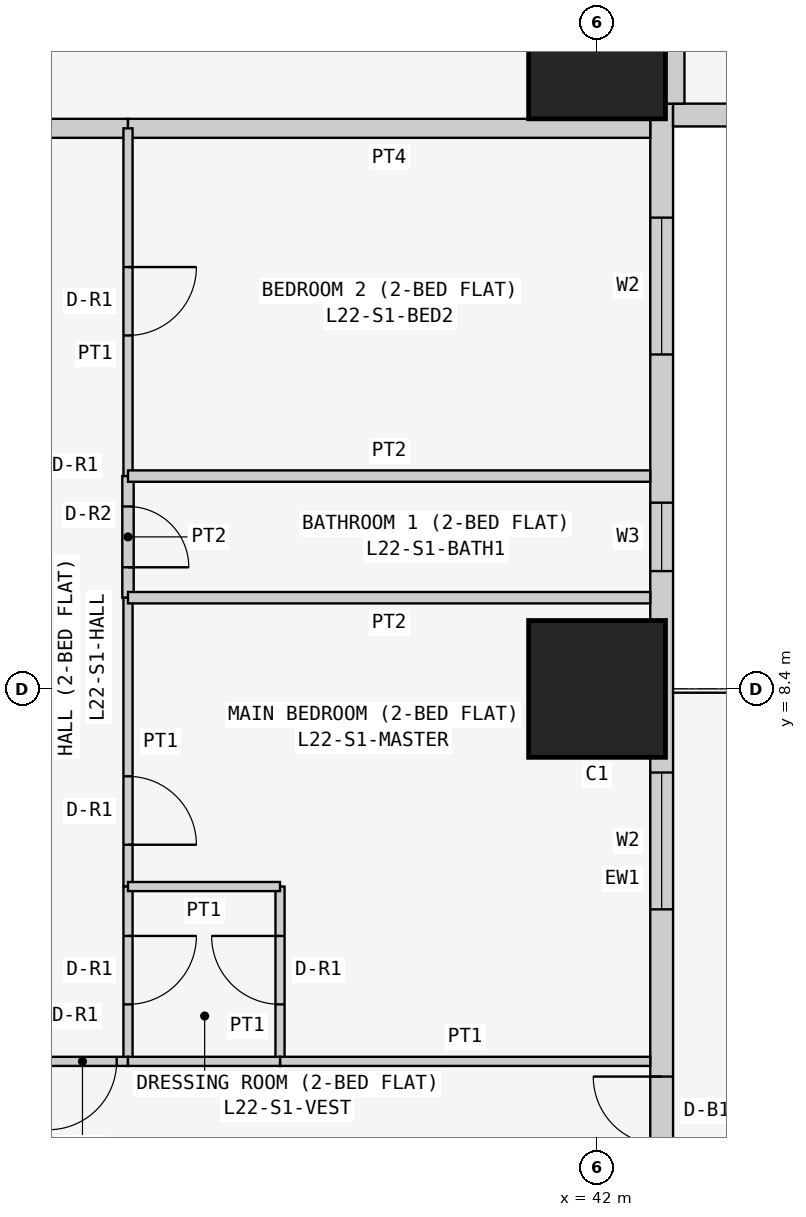
"""IFC4 building model, lengths in metres.
Left out: names, types, materials, properties, quantities, classifications, styles, units other than length and angle.
Written with IfcOpenShell. Run it as: python <this file> out.ifc"""

import sys

from ifc_helpers import new_model, si_unit, direction, frame, frame_2d, origin, origin_2d, place, context, subcontext, project, spatial, rectangle, extrude, element, fill, save


model = new_model("IFC4")
c1 = context("Model", 3, precision=1e-05, world=origin(), true_north=direction((0.0, 1.0)))
c2 = subcontext(c1, "Body", "Model", "MODEL_VIEW")
j1 = project(units=[si_unit("LENGTHUNIT", "METRE"), si_unit("PLANEANGLEUNIT", "RADIAN")], contexts=[c1])
p1 = place(None, origin())
s1 = spatial("IfcSite", under=j1, at=p1, CompositionType="ELEMENT")
p2 = place(p1, origin())
s2 = spatial("IfcBuilding", under=s1, at=p2, CompositionType="ELEMENT")
p3 = place(p2, frame((0.0, 0.0, 88.5)))
s3 = spatial("IfcBuildingStorey", under=s2, at=p3, CompositionType="ELEMENT", Elevation=88.5)
for number, where, z_axis, x_axis in (
    (1, (42.0, 8.4, 0.0), (0.0, 0.0, 1.0), (1.0, 0.0, 0.0)),
    (2, (42.0, 16.8, 0.0), (0.0, 0.0, 1.0), (1.0, 0.0, 0.0)),
):
    element("IfcColumn", number, at=place(p3, frame(where, z_axis=z_axis, x_axis=x_axis)), inside=s3, PredefinedType="COLUMN", context=c2, shape_type="SweptSolid", body=[
        extrude(rectangle(XDim=1.8, YDim=1.8, at=origin_2d()), origin(), (0.0, 0.0, 1.0), 3.6),
    ])
p4 = place(p3, frame((42.85, 0.4, 0.0), z_axis=(0.0, 0.0, 1.0), x_axis=(0.0, 1.0, 0.0)))
e3 = element("IfcWall", 3, at=p4, inside=s3, PredefinedType="SOLIDWALL", context=c2, shape_type="SweptSolid", body=[
    extrude(rectangle(XDim=15.7, YDim=0.3, at=frame_2d((7.85, 0.0))), origin(), (0.0, 0.0, 1.0), 3.45),
])
p5 = place(p4, frame((12.4, 0.0, 0.9)))
e4 = element("IfcOpeningElement", 4, at=p5, cuts=e3, PredefinedType="OPENING", context=c2, shape_type="SweptSolid", body=[
    extrude(rectangle(XDim=1.8, YDim=1.5, at=frame_2d((0.9, 0.75))), frame((0.0, 0.16, 0.0), z_axis=(0.0, -1.0, 0.0), x_axis=(1.0, 0.0, 0.0)), (0.0, 0.0, 1.0), 0.32),
])
p6 = place(p4, frame((9.55, 0.0, 1.5)))
e5 = element("IfcOpeningElement", 5, at=p6, cuts=e3, PredefinedType="OPENING", context=c2, shape_type="SweptSolid", body=[
    extrude(rectangle(XDim=0.9, YDim=0.7, at=frame_2d((0.45, 0.35))), frame((0.0, 0.16, 0.0), z_axis=(0.0, -1.0, 0.0), x_axis=(1.0, 0.0, 0.0)), (0.0, 0.0, 1.0), 0.32),
])
p7 = place(p4, frame((5.1, 0.0, 0.9)))
e6 = element("IfcOpeningElement", 6, at=p7, cuts=e3, PredefinedType="OPENING", context=c2, shape_type="SweptSolid", body=[
    extrude(rectangle(XDim=1.8, YDim=1.5, at=frame_2d((0.9, 0.75))), frame((0.0, 0.16, 0.0), z_axis=(0.0, -1.0, 0.0), x_axis=(1.0, 0.0, 0.0)), (0.0, 0.0, 1.0), 0.32),
])
p8 = place(p4, frame((2.0, 0.0, 0.0)))
e7 = element("IfcOpeningElement", 7, at=p8, cuts=e3, PredefinedType="OPENING", context=c2, shape_type="SweptSolid", body=[
    extrude(rectangle(XDim=0.9, YDim=2.4, at=frame_2d((0.45, 1.2))), frame((0.0, 0.16, 0.0), z_axis=(0.0, -1.0, 0.0), x_axis=(1.0, 0.0, 0.0)), (0.0, 0.0, 1.0), 0.32),
])
p9 = place(p4, frame((0.7, 0.0, 0.9)))
e8 = element("IfcOpeningElement", 8, at=p9, cuts=e3, PredefinedType="OPENING", context=c2, shape_type="SweptSolid", body=[
    extrude(rectangle(XDim=1.2, YDim=1.5, at=frame_2d((0.6, 0.75))), frame((0.0, 0.16, 0.0), z_axis=(0.0, -1.0, 0.0), x_axis=(1.0, 0.0, 0.0)), (0.0, 0.0, 1.0), 0.32),
])
p10 = place(p3, frame((43.0, 15.95, 0.0), z_axis=(0.0, 0.0, 1.0), x_axis=(1.0, 0.0, 0.0)))
e9 = element("IfcWall", 9, at=p10, inside=s3, PredefinedType="SOLIDWALL", context=c2, shape_type="SweptSolid", body=[
    extrude(rectangle(XDim=15.4, YDim=0.3, at=frame_2d((7.7, 0.0))), origin(), (0.0, 0.0, 1.0), 3.45),
])
p11 = place(p10, frame((1.2, 0.0, 0.9)))
e10 = element("IfcOpeningElement", 10, at=p11, cuts=e9, PredefinedType="OPENING", context=c2, shape_type="SweptSolid", body=[
    extrude(rectangle(XDim=1.8, YDim=1.5, at=frame_2d((0.9, 0.75))), frame((0.0, 0.16, 0.0), z_axis=(0.0, -1.0, 0.0), x_axis=(1.0, 0.0, 0.0)), (0.0, 0.0, 1.0), 0.32),
])
p12 = place(p10, frame((4.95, 0.0, 1.5)))
e11 = element("IfcOpeningElement", 11, at=p12, cuts=e9, PredefinedType="OPENING", context=c2, shape_type="SweptSolid", body=[
    extrude(rectangle(XDim=0.9, YDim=0.7, at=frame_2d((0.45, 0.35))), frame((0.0, 0.16, 0.0), z_axis=(0.0, -1.0, 0.0), x_axis=(1.0, 0.0, 0.0)), (0.0, 0.0, 1.0), 0.32),
])
p13 = place(p10, frame((8.5, 0.0, 0.9)))
e12 = element("IfcOpeningElement", 12, at=p13, cuts=e9, PredefinedType="OPENING", context=c2, shape_type="SweptSolid", body=[
    extrude(rectangle(XDim=1.8, YDim=1.5, at=frame_2d((0.9, 0.75))), frame((0.0, 0.16, 0.0), z_axis=(0.0, -1.0, 0.0), x_axis=(1.0, 0.0, 0.0)), (0.0, 0.0, 1.0), 0.32),
])
p14 = place(p10, frame((12.5, 0.0, 0.0)))
e13 = element("IfcOpeningElement", 13, at=p14, cuts=e9, PredefinedType="OPENING", context=c2, shape_type="SweptSolid", body=[
    extrude(rectangle(XDim=0.9, YDim=2.4, at=frame_2d((0.45, 1.2))), frame((0.0, 0.16, 0.0), z_axis=(0.0, -1.0, 0.0), x_axis=(1.0, 0.0, 0.0)), (0.0, 0.0, 1.0), 0.32),
])
p15 = place(p10, frame((13.5, 0.0, 0.9)))
e14 = element("IfcOpeningElement", 14, at=p15, cuts=e9, PredefinedType="OPENING", context=c2, shape_type="SweptSolid", body=[
    extrude(rectangle(XDim=1.2, YDim=1.5, at=frame_2d((0.6, 0.75))), frame((0.0, 0.16, 0.0), z_axis=(0.0, -1.0, 0.0), x_axis=(1.0, 0.0, 0.0)), (0.0, 0.0, 1.0), 0.32),
])
p16 = place(p3, frame((43.025, 22.571, 0.0), z_axis=(0.0, 0.0, 1.0), x_axis=(0.0, -1.0, 0.0)))
e15 = element("IfcWall", 15, at=p16, inside=s3, PredefinedType="PARTITIONING", context=c2, shape_type="SweptSolid", body=[
    extrude(rectangle(XDim=6.471, YDim=0.25, at=frame_2d((3.235, 0.0))), origin(), (0.0, 0.0, 1.0), 3.45),
])
p17 = place(p3, frame((35.829, 15.775, 0.0), z_axis=(0.0, 0.0, 1.0), x_axis=(-1.0, 0.0, 0.0)))
e16 = element("IfcWall", 16, at=p17, inside=s3, PredefinedType="PARTITIONING", context=c2, shape_type="SweptSolid", body=[
    extrude(rectangle(XDim=1.2, YDim=0.25, at=frame_2d((0.6, 0.0))), origin(), (0.0, 0.0, 1.0), 3.45),
])
p18 = place(p3, frame((42.7, 15.775, 0.0), z_axis=(0.0, 0.0, 1.0), x_axis=(-1.0, 0.0, 0.0)))
e17 = element("IfcWall", 17, at=p18, inside=s3, PredefinedType="PARTITIONING", context=c2, shape_type="SweptSolid", body=[
    extrude(rectangle(XDim=6.871, YDim=0.25, at=frame_2d((3.436, 0.0))), origin(), (0.0, 0.0, 1.0), 3.45),
])
p19 = place(p3, frame((35.829, 11.2, 0.0), z_axis=(0.0, 0.0, 1.0), x_axis=(0.0, 1.0, 0.0)))
e18 = element("IfcWall", 18, at=p19, inside=s3, PredefinedType="PARTITIONING", context=c2, shape_type="SweptSolid", body=[
    extrude(rectangle(XDim=4.575, YDim=0.12, at=frame_2d((2.288, 0.0))), origin(), (0.0, 0.0, 1.0), 3.45),
])
p20 = place(p19, frame((1.85, 0.0, 0.0)))
e19 = element("IfcOpeningElement", 19, at=p20, cuts=e18, PredefinedType="OPENING", context=c2, shape_type="SweptSolid", body=[
    extrude(rectangle(XDim=0.9, YDim=2.1, at=frame_2d((0.45, 1.05))), frame((0.0, 0.07, 0.0), z_axis=(0.0, -1.0, 0.0), x_axis=(1.0, 0.0, 0.0)), (0.0, 0.0, 1.0), 0.14),
])
p21 = place(p3, frame((35.829, 9.6, 0.0), z_axis=(0.0, 0.0, 1.0), x_axis=(0.0, 1.0, 0.0)))
e20 = element("IfcWall", 20, at=p21, inside=s3, PredefinedType="PARTITIONING", context=c2, shape_type="SweptSolid", body=[
    extrude(rectangle(XDim=1.6, YDim=0.15, at=frame_2d((0.8, 0.0))), origin(), (0.0, 0.0, 1.0), 3.45),
])
p22 = place(p21, frame((0.4, 0.0, 0.0)))
e21 = element("IfcOpeningElement", 21, at=p22, cuts=e20, PredefinedType="OPENING", context=c2, shape_type="SweptSolid", body=[
    extrude(rectangle(XDim=0.8, YDim=2.1, at=frame_2d((0.4, 1.05))), frame((0.0, 0.085, 0.0), z_axis=(0.0, -1.0, 0.0), x_axis=(1.0, 0.0, 0.0)), (0.0, 0.0, 1.0), 0.17),
])
p23 = place(p3, frame((35.829, 5.8, 0.0), z_axis=(0.0, 0.0, 1.0), x_axis=(0.0, 1.0, 0.0)))
e22 = element("IfcWall", 22, at=p23, inside=s3, PredefinedType="PARTITIONING", context=c2, shape_type="SweptSolid", body=[
    extrude(rectangle(XDim=3.8, YDim=0.12, at=frame_2d((1.9, 0.0))), origin(), (0.0, 0.0, 1.0), 3.45),
])
p24 = place(p23, frame((0.55, 0.0, 0.0)))
e23 = element("IfcOpeningElement", 23, at=p24, cuts=e22, PredefinedType="OPENING", context=c2, shape_type="SweptSolid", body=[
    extrude(rectangle(XDim=0.9, YDim=2.1, at=frame_2d((0.45, 1.05))), frame((0.0, 0.07, 0.0), z_axis=(0.0, -1.0, 0.0), x_axis=(1.0, 0.0, 0.0)), (0.0, 0.0, 1.0), 0.14),
])
p25 = place(p3, frame((35.829, 3.5, 0.0), z_axis=(0.0, 0.0, 1.0), x_axis=(0.0, 1.0, 0.0)))
e24 = element("IfcWall", 24, at=p25, inside=s3, PredefinedType="PARTITIONING", context=c2, shape_type="SweptSolid", body=[
    extrude(rectangle(XDim=2.3, YDim=0.12, at=frame_2d((1.15, 0.0))), origin(), (0.0, 0.0, 1.0), 3.45),
])
p26 = place(p25, frame((0.75, 0.0, 0.0)))
e25 = element("IfcOpeningElement", 25, at=p26, cuts=e24, PredefinedType="OPENING", context=c2, shape_type="SweptSolid", body=[
    extrude(rectangle(XDim=0.9, YDim=2.1, at=frame_2d((0.45, 1.05))), frame((0.0, 0.07, 0.0), z_axis=(0.0, -1.0, 0.0), x_axis=(1.0, 0.0, 0.0)), (0.0, 0.0, 1.0), 0.14),
])
p27 = place(p3, frame((34.629, 3.5, 0.0), z_axis=(0.0, 0.0, 1.0), x_axis=(1.0, 0.0, 0.0)))
e26 = element("IfcWall", 26, at=p27, inside=s3, PredefinedType="PARTITIONING", context=c2, shape_type="SweptSolid", body=[
    extrude(rectangle(XDim=1.2, YDim=0.12, at=frame_2d((0.6, 0.0))), origin(), (0.0, 0.0, 1.0), 3.45),
])
p28 = place(p27, frame((0.151, 0.0, 0.0)))
e27 = element("IfcOpeningElement", 27, at=p28, cuts=e26, PredefinedType="OPENING", context=c2, shape_type="SweptSolid", body=[
    extrude(rectangle(XDim=0.9, YDim=2.1, at=frame_2d((0.45, 1.05))), frame((0.0, 0.07, 0.0), z_axis=(0.0, -1.0, 0.0), x_axis=(1.0, 0.0, 0.0)), (0.0, 0.0, 1.0), 0.14),
])
for number, where, z_axis, x_axis in (
    (28, (35.829, 11.2, 0.0), (0.0, 0.0, 1.0), (1.0, 0.0, 0.0)),
    (29, (35.829, 9.6, 0.0), (0.0, 0.0, 1.0), (1.0, 0.0, 0.0)),
):
    element("IfcWall", number, at=place(p3, frame(where, z_axis=z_axis, x_axis=x_axis)), inside=s3, PredefinedType="PARTITIONING", context=c2, shape_type="SweptSolid", body=[
        extrude(rectangle(XDim=6.871, YDim=0.15, at=frame_2d((3.436, 0.0))), origin(), (0.0, 0.0, 1.0), 3.45),
    ])
p29 = place(p3, frame((37.829, 3.5, 0.0), z_axis=(0.0, 0.0, 1.0), x_axis=(0.0, 1.0, 0.0)))
e30 = element("IfcWall", 30, at=p29, inside=s3, PredefinedType="PARTITIONING", context=c2, shape_type="SweptSolid", body=[
    extrude(rectangle(XDim=2.3, YDim=0.12, at=frame_2d((1.15, 0.0))), origin(), (0.0, 0.0, 1.0), 2.848),
])
p30 = place(p29, frame((0.75, 0.0, 0.0)))
e31 = element("IfcOpeningElement", 31, at=p30, cuts=e30, PredefinedType="OPENING", context=c2, shape_type="SweptSolid", body=[
    extrude(rectangle(XDim=0.9, YDim=2.1, at=frame_2d((0.45, 1.05))), frame((0.0, 0.07, 0.0), z_axis=(0.0, -1.0, 0.0), x_axis=(1.0, 0.0, 0.0)), (0.0, 0.0, 1.0), 0.14),
])
p31 = place(p3, frame((37.829, 5.8, 0.0), z_axis=(0.0, 0.0, 1.0), x_axis=(-1.0, 0.0, 0.0)))
e32 = element("IfcWall", 32, at=p31, inside=s3, PredefinedType="PARTITIONING", context=c2, shape_type="SweptSolid", body=[
    extrude(rectangle(XDim=2.0, YDim=0.12, at=frame_2d((1.0, 0.0))), origin(), (0.0, 0.0, 1.0), 3.45),
])
p32 = place(p3, frame((42.7, 3.5, 0.0), z_axis=(0.0, 0.0, 1.0), x_axis=(-1.0, 0.0, 0.0)))
e33 = element("IfcWall", 33, at=p32, inside=s3, PredefinedType="PARTITIONING", context=c2, shape_type="SweptSolid", body=[
    extrude(rectangle(XDim=4.871, YDim=0.12, at=frame_2d((2.436, 0.0))), origin(), (0.0, 0.0, 1.0), 3.45),
])
p33 = place(p3, frame((35.829, 3.5, 0.0), z_axis=(0.0, 0.0, 1.0), x_axis=(1.0, 0.0, 0.0)))
e34 = element("IfcWall", 34, at=p33, inside=s3, PredefinedType="PARTITIONING", context=c2, shape_type="SweptSolid", body=[
    extrude(rectangle(XDim=2.0, YDim=0.12, at=frame_2d((1.0, 0.0))), origin(), (0.0, 0.0, 1.0), 3.45),
])
p34 = place(p5, origin())
e35 = element("IfcWindow", 35, at=p34, inside=s3, PartitioningType="SINGLE_PANEL", PredefinedType="WINDOW", context=c2, shape_type="SweptSolid", body=[
    extrude(rectangle(XDim=1.8, YDim=1.5, at=frame_2d((0.9, 0.75))), frame((0.0, 0.03, 0.0), z_axis=(0.0, -1.0, 0.0), x_axis=(1.0, 0.0, 0.0)), (0.0, 0.0, 1.0), 0.06),
])
fill(e4, e35)
p35 = place(p6, origin())
e36 = element("IfcWindow", 36, at=p35, inside=s3, PartitioningType="SINGLE_PANEL", PredefinedType="WINDOW", context=c2, shape_type="SweptSolid", body=[
    extrude(rectangle(XDim=0.9, YDim=0.7, at=frame_2d((0.45, 0.35))), frame((0.0, 0.03, 0.0), z_axis=(0.0, -1.0, 0.0), x_axis=(1.0, 0.0, 0.0)), (0.0, 0.0, 1.0), 0.06),
])
fill(e5, e36)
p36 = place(p7, origin())
e37 = element("IfcWindow", 37, at=p36, inside=s3, PartitioningType="SINGLE_PANEL", PredefinedType="WINDOW", context=c2, shape_type="SweptSolid", body=[
    extrude(rectangle(XDim=1.8, YDim=1.5, at=frame_2d((0.9, 0.75))), frame((0.0, 0.03, 0.0), z_axis=(0.0, -1.0, 0.0), x_axis=(1.0, 0.0, 0.0)), (0.0, 0.0, 1.0), 0.06),
])
fill(e6, e37)
p37 = place(p8, origin())
e38 = element("IfcDoor", 38, at=p37, inside=s3, OperationType="SINGLE_SWING_RIGHT", PredefinedType="DOOR", context=c2, shape_type="SweptSolid", body=[
    extrude(rectangle(XDim=0.9, YDim=2.4, at=frame_2d((0.45, 1.2))), frame((0.0, 0.025, 0.0), z_axis=(0.0, -1.0, 0.0), x_axis=(1.0, 0.0, 0.0)), (0.0, 0.0, 1.0), 0.05),
])
fill(e7, e38)
p38 = place(p20, frame((0.9, 0.0, 0.0), z_axis=(0.0, 0.0, 1.0), x_axis=(-1.0, 0.0, 0.0)))
e39 = element("IfcDoor", 39, at=p38, inside=s3, OperationType="SINGLE_SWING_LEFT", PredefinedType="DOOR", context=c2, shape_type="SweptSolid", body=[
    extrude(rectangle(XDim=0.9, YDim=2.1, at=frame_2d((0.45, 1.05))), frame((0.0, 0.025, 0.0), z_axis=(0.0, -1.0, 0.0), x_axis=(1.0, 0.0, 0.0)), (0.0, 0.0, 1.0), 0.05),
])
fill(e19, e39)
p39 = place(p22, frame((0.8, 0.0, 0.0), z_axis=(0.0, 0.0, 1.0), x_axis=(-1.0, 0.0, 0.0)))
e40 = element("IfcDoor", 40, at=p39, inside=s3, OperationType="SINGLE_SWING_RIGHT", PredefinedType="DOOR", context=c2, shape_type="SweptSolid", body=[
    extrude(rectangle(XDim=0.8, YDim=2.1, at=frame_2d((0.4, 1.05))), frame((0.0, 0.025, 0.0), z_axis=(0.0, -1.0, 0.0), x_axis=(1.0, 0.0, 0.0)), (0.0, 0.0, 1.0), 0.05),
])
fill(e21, e40)
p40 = place(p24, frame((0.9, 0.0, 0.0), z_axis=(0.0, 0.0, 1.0), x_axis=(-1.0, 0.0, 0.0)))
e41 = element("IfcDoor", 41, at=p40, inside=s3, OperationType="SINGLE_SWING_RIGHT", PredefinedType="DOOR", context=c2, shape_type="SweptSolid", body=[
    extrude(rectangle(XDim=0.9, YDim=2.1, at=frame_2d((0.45, 1.05))), frame((0.0, 0.025, 0.0), z_axis=(0.0, -1.0, 0.0), x_axis=(1.0, 0.0, 0.0)), (0.0, 0.0, 1.0), 0.05),
])
fill(e23, e41)
p41 = place(p26, frame((0.9, 0.0, 0.0), z_axis=(0.0, 0.0, 1.0), x_axis=(-1.0, 0.0, 0.0)))
e42 = element("IfcDoor", 42, at=p41, inside=s3, OperationType="SINGLE_SWING_LEFT", PredefinedType="DOOR", context=c2, shape_type="SweptSolid", body=[
    extrude(rectangle(XDim=0.9, YDim=2.1, at=frame_2d((0.45, 1.05))), frame((0.0, 0.025, 0.0), z_axis=(0.0, -1.0, 0.0), x_axis=(1.0, 0.0, 0.0)), (0.0, 0.0, 1.0), 0.05),
])
fill(e25, e42)
p42 = place(p30, origin())
e43 = element("IfcDoor", 43, at=p42, inside=s3, OperationType="SINGLE_SWING_RIGHT", PredefinedType="DOOR", context=c2, shape_type="SweptSolid", body=[
    extrude(rectangle(XDim=0.9, YDim=2.1, at=frame_2d((0.45, 1.05))), frame((0.0, 0.025, 0.0), z_axis=(0.0, -1.0, 0.0), x_axis=(1.0, 0.0, 0.0)), (0.0, 0.0, 1.0), 0.05),
])
fill(e31, e43)
p43 = place(p28, frame((0.9, 0.0, 0.0), z_axis=(0.0, 0.0, 1.0), x_axis=(-1.0, 0.0, 0.0)))
e44 = element("IfcDoor", 44, at=p43, inside=s3, OperationType="SINGLE_SWING_RIGHT", PredefinedType="DOOR", context=c2, shape_type="SweptSolid", body=[
    extrude(rectangle(XDim=0.9, YDim=2.1, at=frame_2d((0.45, 1.05))), frame((0.0, 0.025, 0.0), z_axis=(0.0, -1.0, 0.0), x_axis=(1.0, 0.0, 0.0)), (0.0, 0.0, 1.0), 0.05),
])
fill(e27, e44)
save(model, sys.argv[1])
